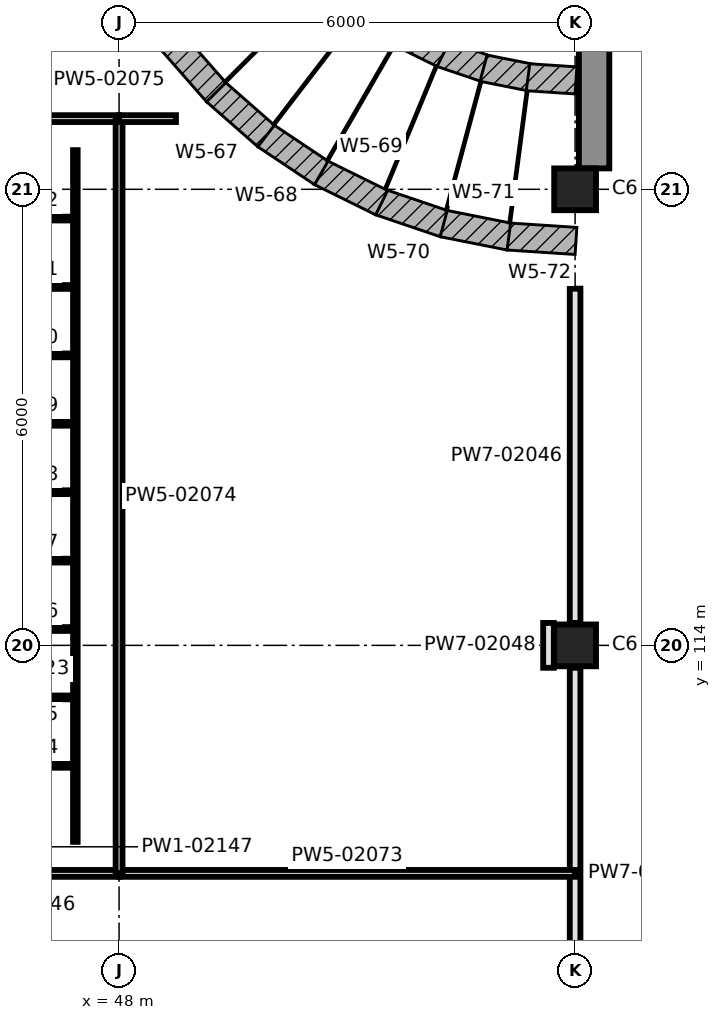
"""IFC4 building model, lengths in metres.
Left out: names, types, materials, properties, quantities, classifications, styles, units other than length and angle.
Written with IfcOpenShell. Run it as: python <this file> out.ifc"""

import sys

from ifc_helpers import new_model, si_unit, direction, frame, frame_2d, origin, origin_2d, place, context, subcontext, project, spatial, polyline, rectangle, outline, extrude, element, fill, save


model = new_model("IFC4")
c1 = context("Model", 3, precision=1e-05, world=origin(), true_north=direction((0.0, 1.0)))
c2 = subcontext(c1, "Body", "Model", "MODEL_VIEW")
j1 = project(units=[si_unit("LENGTHUNIT", "METRE"), si_unit("PLANEANGLEUNIT", "RADIAN")], contexts=[c1])
p1 = place(None, origin())
s1 = spatial("IfcSite", under=j1, at=p1, CompositionType="ELEMENT")
p2 = place(p1, origin())
s2 = spatial("IfcBuilding", under=s1, at=p2, CompositionType="ELEMENT")
p3 = place(p2, frame((0.0, 0.0, 12.0)))
s3 = spatial("IfcBuildingStorey", under=s2, at=p3, CompositionType="ELEMENT", Elevation=12.0)
for number, where, z_axis, x_axis in (
    (1, (54.0, 114.0, 0.0), (0.0, 0.0, 1.0), (1.0, 0.0, 0.0)),
    (2, (54.0, 120.0, 0.0), (0.0, 0.0, 1.0), (1.0, 0.0, 0.0)),
):
    element("IfcColumn", number, at=place(p3, frame(where, z_axis=z_axis, x_axis=x_axis)), inside=s3, PredefinedType="COLUMN", context=c2, shape_type="SweptSolid", body=[
        extrude(rectangle(XDim=0.55, YDim=0.55, at=origin_2d()), origin(), (0.0, 0.0, 1.0), 4.25),
    ])
p4 = place(p3, frame((48.56, 121.825, 0.0), z_axis=(-0.74138193161, -0.495258620594, 0.452848462745), x_axis=(-0.555487117891, 0.831525141854, -1.792587e-05)))
e3 = element("IfcWall", 3, at=p4, inside=s3, PredefinedType="SOLIDWALL", context=c2, shape_type="SweptSolid", body=[
    extrude(outline(polyline([(0.0, 0.0), (0.897, 2.776e-17), (0.759, -4.655), (0.138, -4.654), (0.0, 0.0)])), origin(), (-9.955e-05, 0.453, 0.892), 0.449),
])
p5 = place(p3, frame((49.152, 121.151, 0.0), z_axis=(-0.67027340996, -0.587941516676, 0.452833665786), x_axis=(-0.659435029258, 0.751761559077, -2.1938488e-05)))
e4 = element("IfcWall", 4, at=p5, inside=s3, PredefinedType="SOLIDWALL", context=c2, shape_type="SweptSolid", body=[
    extrude(outline(polyline([(0.0, 0.0), (0.897, 2.776e-17), (0.759, -4.654), (0.138, -4.654), (0.0, 0.0)])), origin(), (0.0, 0.453, 0.892), 0.449),
])
p6 = place(p3, frame((49.826, 120.56, 0.0), z_axis=(-0.58793091204, -0.670281410701, 0.452835591728), x_axis=(-0.75177274522, 0.659422276866, 1.779507e-05)))
e5 = element("IfcWall", 5, at=p6, inside=s3, PredefinedType="SOLIDWALL", context=c2, shape_type="SweptSolid", body=[
    extrude(outline(polyline([(0.0, 0.0), (0.897, -5.551e-17), (0.759, -4.654), (0.138, -4.654), (0.0, 0.0)])), origin(), (-0.0, 0.453, 0.892), 0.449),
])
p7 = place(p3, frame((50.572, 120.061, 0.0), z_axis=(-0.495362670827, -0.741323001014, 0.452831130245), x_axis=(-0.831466073356, 0.55557552822, -3.6077311e-05)))
e6 = element("IfcWall", 6, at=p7, inside=s3, PredefinedType="SOLIDWALL", context=c2, shape_type="SweptSolid", body=[
    extrude(outline(polyline([(0.0, 0.0), (0.897, 0.0), (0.759, -4.654), (0.138, -4.654), (0.0, 0.0)])), origin(), (-6.778e-06, 0.453, 0.892), 0.449),
])
p8 = place(p3, frame((51.376, 119.665, 0.0), z_axis=(-0.394311536262, -0.799667811809, 0.452824251921), x_axis=(-0.896885337172, 0.44226314716, 2.5104622e-05)))
e7 = element("IfcWall", 7, at=p8, inside=s3, PredefinedType="SOLIDWALL", context=c2, shape_type="SweptSolid", body=[
    extrude(outline(polyline([(0.0, 0.0), (0.897, 0.0), (0.759, -4.654), (0.138, -4.654), (0.0, 0.0)])), origin(), (2.864e-05, 0.453, 0.892), 0.449),
])
p9 = place(p3, frame((52.225, 119.376, 0.0), z_axis=(-0.286590212598, -0.84427927495, 0.4528339165), x_axis=(-0.946930554063, 0.321438214512, 5.728117e-06)))
e8 = element("IfcWall", 8, at=p9, inside=s3, PredefinedType="SOLIDWALL", context=c2, shape_type="SweptSolid", body=[
    extrude(outline(polyline([(0.0, 0.0), (0.897, 0.0), (0.759, -4.654), (0.138, -4.654), (0.0, 0.0)])), origin(), (9.219e-07, 0.453, 0.892), 0.449),
])
p10 = place(p3, frame((53.105, 119.201, 0.0), z_axis=(-0.173864175636, -0.874485160623, 0.452821104058), x_axis=(-0.980806494595, 0.194983637213, -3.7134606e-05)))
e9 = element("IfcWall", 9, at=p10, inside=s3, PredefinedType="SOLIDWALL", context=c2, shape_type="SweptSolid", body=[
    extrude(outline(polyline([(0.0, 0.0), (0.897, 0.0), (0.758, -4.654), (0.138, -4.654), (0.0, 0.0)])), origin(), (0.0, 0.453, 0.892), 0.449),
])
p11 = place(p3, frame((54.0, 119.143, 0.0), z_axis=(-0.058375301922, -0.889685498337, 0.452826719811), x_axis=(-0.997852682036, 0.065498262539, 5.0577314e-05)))
e10 = element("IfcWall", 10, at=p11, inside=s3, PredefinedType="SOLIDWALL", context=c2, shape_type="SweptSolid", body=[
    extrude(outline(polyline([(0.0, 0.0), (0.897, -3.469e-18), (0.759, -4.654), (0.139, -4.654), (0.0, 0.0)])), origin(), (-9.547e-05, 0.453, 0.892), 0.449),
])
p12 = place(p3, frame((54.25, 120.275, 0.0), z_axis=(0.0, 0.0, 1.0), x_axis=(0.0, 1.0, 0.0)))
e11 = element("IfcWall", 11, at=p12, inside=s3, PredefinedType="SOLIDWALL", context=c2, shape_type="SweptSolid", body=[
    extrude(rectangle(XDim=5.25, YDim=0.4, at=frame_2d((2.625, 0.0))), origin(), (0.0, 0.0, 1.0), 4.25),
])
p13 = place(p3, frame((54.0, 108.295, 0.0), z_axis=(0.0, 0.0, 1.0), x_axis=(0.0, 1.0, 0.0)))
e12 = element("IfcWall", 12, at=p13, inside=s3, PredefinedType="PARTITIONING", context=c2, shape_type="SweptSolid", body=[
    extrude(rectangle(XDim=5.41, YDim=0.14, at=frame_2d((2.705, 0.0))), origin(), (0.0, 0.0, 1.0), 3.45),
])
p14 = place(p13, frame((0.255, 0.0, 0.0)))
e13 = element("IfcOpeningElement", 13, at=p14, cuts=e12, PredefinedType="OPENING", context=c2, shape_type="SweptSolid", body=[
    extrude(rectangle(XDim=1.8, YDim=2.1, at=frame_2d((0.9, 1.05))), frame((0.0, 0.08, 0.0), z_axis=(0.0, -1.0, 0.0), x_axis=(1.0, 0.0, 0.0)), (0.0, 0.0, 1.0), 0.16),
])
p15 = place(p3, frame((54.0, 114.295, 0.0), z_axis=(0.0, 0.0, 1.0), x_axis=(0.0, 1.0, 0.0)))
e14 = element("IfcWall", 14, at=p15, inside=s3, PredefinedType="PARTITIONING", context=c2, shape_type="SweptSolid", body=[
    extrude(rectangle(XDim=4.398, YDim=0.14, at=frame_2d((2.199, 0.0))), origin(), (0.0, 0.0, 1.0), 3.45),
])
p16 = place(p15, frame((0.155, 0.0, 0.0)))
e15 = element("IfcOpeningElement", 15, at=p16, cuts=e14, PredefinedType="OPENING", context=c2, shape_type="SweptSolid", body=[
    extrude(rectangle(XDim=0.92, YDim=2.04, at=frame_2d((0.46, 1.02))), frame((0.0, 0.08, 0.0), z_axis=(0.0, -1.0, 0.0), x_axis=(1.0, 0.0, 0.0)), (0.0, 0.0, 1.0), 0.16),
])
p17 = place(p3, frame((53.65, 113.705, 0.0), z_axis=(0.0, 0.0, 1.0), x_axis=(0.0, 1.0, 0.0)))
e16 = element("IfcWall", 16, at=p17, inside=s3, PredefinedType="PARTITIONING", context=c2, shape_type="SweptSolid", body=[
    extrude(rectangle(XDim=0.59, YDim=0.14, at=frame_2d((0.295, 0.0))), origin(), (0.0, 0.0, 1.0), 4.25),
])
for number, where, z_axis, x_axis in (
    (17, (42.0, 120.93, 0.0), (0.0, 0.0, 1.0), (1.0, 0.0, 0.0)),
    (18, (42.0, 111.0, 0.0), (0.0, 0.0, 1.0), (1.0, 0.0, 0.0)),
    (19, (48.0, 111.0, 0.0), (0.0, 0.0, 1.0), (1.0, 0.0, 0.0)),
):
    element("IfcWall", number, at=place(p3, frame(where, z_axis=z_axis, x_axis=x_axis)), inside=s3, PredefinedType="PARTITIONING", context=c2, shape_type="SweptSolid", body=[
        extrude(rectangle(XDim=6.0, YDim=0.09, at=frame_2d((3.0, 0.0))), origin(), (0.0, 0.0, 1.0), 4.25),
    ])
p18 = place(p3, frame((48.0, 111.0, 0.0), z_axis=(0.0, 0.0, 1.0), x_axis=(0.0, 1.0, 0.0)))
e20 = element("IfcWall", 20, at=p18, inside=s3, PredefinedType="PARTITIONING", context=c2, shape_type="SweptSolid", body=[
    extrude(rectangle(XDim=9.93, YDim=0.09, at=frame_2d((4.965, 0.0))), origin(), (0.0, 0.0, 1.0), 4.25),
])
p19 = place(p3, frame((48.0, 120.93, 0.0), z_axis=(0.0, 0.0, 1.0), x_axis=(1.0, 0.0, 0.0)))
e21 = element("IfcWall", 21, at=p19, inside=s3, PredefinedType="PARTITIONING", context=c2, shape_type="SweptSolid", body=[
    extrude(rectangle(XDim=0.749, YDim=0.09, at=frame_2d((0.374, 0.0))), origin(), (0.0, 0.0, 1.0), 4.25),
])
p20 = place(p3, frame((47.425, 111.415, 0.0), z_axis=(0.0, 0.0, 1.0), x_axis=(0.0, 1.0, 0.0)))
e22 = element("IfcWall", 22, at=p20, inside=s3, PredefinedType="PARTITIONING", context=c2, shape_type="SweptSolid", body=[
    extrude(rectangle(XDim=9.1, YDim=0.06, at=frame_2d((4.55, 0.0))), origin(), (0.0, 0.0, 1.0), 2.1),
])
for number, where, z_axis, x_axis in (
    (23, (45.525, 112.415, 0.0), (0.0, 0.0, 1.0), (1.0, 0.0, 0.0)),
    (24, (45.525, 113.315, 0.0), (0.0, 0.0, 1.0), (1.0, 0.0, 0.0)),
    (25, (45.525, 114.215, 0.0), (0.0, 0.0, 1.0), (1.0, 0.0, 0.0)),
    (26, (45.525, 115.115, 0.0), (0.0, 0.0, 1.0), (1.0, 0.0, 0.0)),
    (27, (45.525, 116.015, 0.0), (0.0, 0.0, 1.0), (1.0, 0.0, 0.0)),
    (28, (45.525, 116.915, 0.0), (0.0, 0.0, 1.0), (1.0, 0.0, 0.0)),
    (29, (45.525, 117.815, 0.0), (0.0, 0.0, 1.0), (1.0, 0.0, 0.0)),
    (30, (45.525, 118.715, 0.0), (0.0, 0.0, 1.0), (1.0, 0.0, 0.0)),
    (31, (45.525, 119.615, 0.0), (0.0, 0.0, 1.0), (1.0, 0.0, 0.0)),
):
    element("IfcWall", number, at=place(p3, frame(where, z_axis=z_axis, x_axis=x_axis)), inside=s3, PredefinedType="PARTITIONING", context=c2, shape_type="SweptSolid", body=[
        extrude(rectangle(XDim=1.9, YDim=0.05, at=frame_2d((0.95, 0.0))), origin(), (0.0, 0.0, 1.0), 2.1),
    ])
p21 = place(p16, origin())
e32 = element("IfcDoor", 32, at=p21, inside=s3, OperationType="SINGLE_SWING_LEFT", PredefinedType="DOOR", context=c2, shape_type="SweptSolid", body=[
    extrude(rectangle(XDim=0.92, YDim=2.04, at=frame_2d((0.46, 1.02))), frame((0.0, 0.025, 0.0), z_axis=(0.0, -1.0, 0.0), x_axis=(1.0, 0.0, 0.0)), (0.0, 0.0, 1.0), 0.05),
])
fill(e15, e32)
p22 = place(p14, origin())
e33 = element("IfcDoor", 33, at=p22, inside=s3, OperationType="DOUBLE_DOOR_SINGLE_SWING", PredefinedType="DOOR", context=c2, shape_type="SweptSolid", body=[
    extrude(rectangle(XDim=1.8, YDim=2.1, at=frame_2d((0.9, 1.05))), frame((0.0, 0.025, 0.0), z_axis=(0.0, -1.0, 0.0), x_axis=(1.0, 0.0, 0.0)), (0.0, 0.0, 1.0), 0.05),
])
fill(e13, e33)
save(model, sys.argv[1])
